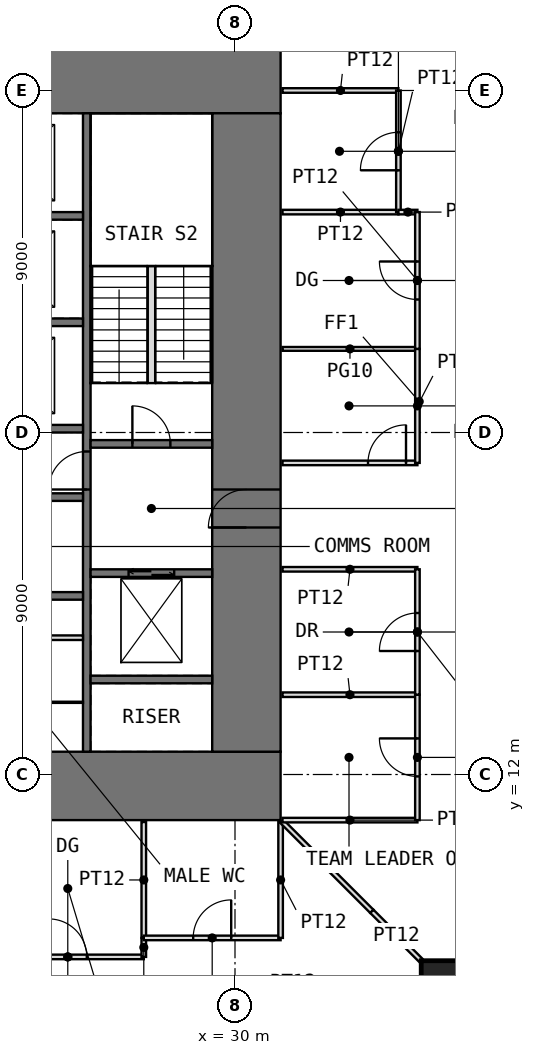
"""IFC4 building model, lengths in metres.
Left out: names, types, materials, properties, quantities, classifications, styles, units other than length and angle.
Written with IfcOpenShell. Run it as: python <this file> out.ifc"""

import sys

from ifc_helpers import new_model, si_unit, direction, frame, frame_2d, origin, origin_2d, place, context, subcontext, project, spatial, rectangle, extrude, element, fill, save


model = new_model("IFC4")
c1 = context("Model", 3, precision=1e-05, world=origin(), true_north=direction((0.0, 1.0)))
c2 = subcontext(c1, "Body", "Model", "MODEL_VIEW")
j1 = project(units=[si_unit("LENGTHUNIT", "METRE"), si_unit("PLANEANGLEUNIT", "RADIAN")], contexts=[c1])
p1 = place(None, origin())
s1 = spatial("IfcSite", under=j1, at=p1, CompositionType="ELEMENT")
p2 = place(p1, origin())
s2 = spatial("IfcBuilding", under=s1, at=p2, CompositionType="ELEMENT")
p3 = place(p2, frame((0.0, 0.0, 58.5)))
s3 = spatial("IfcBuildingStorey", under=s2, at=p3, CompositionType="ELEMENT", Elevation=58.5)
p4 = place(p3, frame((35.45, 6.55, 0.0), z_axis=(0.0, 0.0, 1.0), x_axis=(1.0, 0.0, 0.0)))
e1 = element("IfcColumn", 1, at=p4, inside=s3, PredefinedType="COLUMN", context=c2, shape_type="SweptSolid", body=[
    extrude(rectangle(XDim=1.1, YDim=1.1, at=origin_2d()), origin(), (0.0, 0.0, 1.0), 4.0),
])
p5 = place(p3, frame((10.8, 11.7, -0.05), z_axis=(0.0, 0.0, 1.0), x_axis=(1.0, 0.0, 0.0)))
e2 = element("IfcWall", 2, at=p5, inside=s3, PredefinedType="SHEAR", context=c2, shape_type="SweptSolid", body=[
    extrude(rectangle(XDim=20.4, YDim=1.8, at=frame_2d((10.2, 0.0))), origin(), (0.0, 0.0, 1.0), 4.0),
])
p6 = place(p5, frame((9.2, 0.0, 0.05)))
e3 = element("IfcOpeningElement", 3, at=p6, cuts=e2, PredefinedType="OPENING", context=c2, shape_type="SweptSolid", body=[
    extrude(rectangle(XDim=2.0, YDim=2.2, at=frame_2d((1.0, 1.1))), frame((0.0, 0.91, 0.0), z_axis=(0.0, -1.0, 0.0), x_axis=(1.0, 0.0, 0.0)), (0.0, 0.0, 1.0), 1.82),
])
p7 = place(p3, frame((10.8, 30.3, -0.05), z_axis=(0.0, 0.0, 1.0), x_axis=(1.0, 0.0, 0.0)))
e4 = element("IfcWall", 4, at=p7, inside=s3, PredefinedType="SHEAR", context=c2, shape_type="SweptSolid", body=[
    extrude(rectangle(XDim=20.4, YDim=1.8, at=frame_2d((10.2, 0.0))), origin(), (0.0, 0.0, 1.0), 4.0),
])
p8 = place(p7, frame((9.2, 0.0, 0.05)))
e5 = element("IfcOpeningElement", 5, at=p8, cuts=e4, PredefinedType="OPENING", context=c2, shape_type="SweptSolid", body=[
    extrude(rectangle(XDim=2.0, YDim=2.2, at=frame_2d((1.0, 1.1))), frame((0.0, 0.91, 0.0), z_axis=(0.0, -1.0, 0.0), x_axis=(1.0, 0.0, 0.0)), (0.0, 0.0, 1.0), 1.82),
])
p9 = place(p3, frame((30.3, 12.6, -0.05), z_axis=(0.0, 0.0, 1.0), x_axis=(0.0, 1.0, 0.0)))
e6 = element("IfcWall", 6, at=p9, inside=s3, PredefinedType="SHEAR", context=c2, shape_type="SweptSolid", body=[
    extrude(rectangle(XDim=16.8, YDim=1.8, at=frame_2d((8.4, 0.0))), origin(), (0.0, 0.0, 1.0), 4.0),
])
p10 = place(p9, frame((5.9, 0.0, 0.05)))
e7 = element("IfcOpeningElement", 7, at=p10, cuts=e6, PredefinedType="OPENING", context=c2, shape_type="SweptSolid", body=[
    extrude(rectangle(XDim=1.0, YDim=2.2, at=frame_2d((0.5, 1.1))), frame((0.0, 0.91, 0.0), z_axis=(0.0, -1.0, 0.0), x_axis=(1.0, 0.0, 0.0)), (0.0, 0.0, 1.0), 1.82),
])
p11 = place(p3, frame((26.1, 12.6, -0.05), z_axis=(0.0, 0.0, 1.0), x_axis=(0.0, 1.0, 0.0)))
e8 = element("IfcWall", 8, at=p11, inside=s3, PredefinedType="SHEAR", context=c2, shape_type="SweptSolid", body=[
    extrude(rectangle(XDim=16.8, YDim=0.2, at=frame_2d((8.4, 0.0))), origin(), (0.0, 0.0, 1.0), 4.0),
])
p12 = place(p11, frame((6.9, 0.0, 0.05)))
e9 = element("IfcOpeningElement", 9, at=p12, cuts=e8, PredefinedType="OPENING", context=c2, shape_type="SweptSolid", body=[
    extrude(rectangle(XDim=1.0, YDim=2.2, at=frame_2d((0.5, 1.1))), frame((0.0, 0.11, 0.0), z_axis=(0.0, -1.0, 0.0), x_axis=(1.0, 0.0, 0.0)), (0.0, 0.0, 1.0), 0.22),
])
for number, where, z_axis, x_axis in (
    (10, (22.8, 16.7, -0.05), (0.0, 0.0, 1.0), (1.0, 0.0, 0.0)),
    (11, (22.8, 19.3, -0.05), (0.0, 0.0, 1.0), (1.0, 0.0, 0.0)),
    (12, (22.8, 21.1, -0.05), (0.0, 0.0, 1.0), (1.0, 0.0, 0.0)),
    (13, (22.8, 23.9, -0.05), (0.0, 0.0, 1.0), (1.0, 0.0, 0.0)),
    (14, (22.8, 26.7, -0.05), (0.0, 0.0, 1.0), (1.0, 0.0, 0.0)),
    (15, (26.2, 14.5, -0.05), (0.0, 0.0, 1.0), (1.0, 0.0, 0.0)),
):
    element("IfcWall", number, at=place(p3, frame(where, z_axis=z_axis, x_axis=x_axis)), inside=s3, PredefinedType="SHEAR", context=c2, shape_type="SweptSolid", body=[
        extrude(rectangle(XDim=3.2, YDim=0.2, at=frame_2d((1.6, 0.0))), origin(), (0.0, 0.0, 1.0), 4.0),
    ])
p13 = place(p3, frame((26.2, 17.3, -0.05), z_axis=(0.0, 0.0, 1.0), x_axis=(1.0, 0.0, 0.0)))
e16 = element("IfcWall", 16, at=p13, inside=s3, PredefinedType="SHEAR", context=c2, shape_type="SweptSolid", body=[
    extrude(rectangle(XDim=3.2, YDim=0.2, at=frame_2d((1.6, 0.0))), origin(), (0.0, 0.0, 1.0), 4.0),
])
p14 = place(p13, frame((1.0, 0.0, 0.05)))
e17 = element("IfcOpeningElement", 17, at=p14, cuts=e16, PredefinedType="OPENING", context=c2, shape_type="SweptSolid", body=[
    extrude(rectangle(XDim=1.2, YDim=2.2, at=frame_2d((0.6, 1.1))), frame((0.0, 0.11, 0.0), z_axis=(0.0, -1.0, 0.0), x_axis=(1.0, 0.0, 0.0)), (0.0, 0.0, 1.0), 0.22),
])
p15 = place(p3, frame((26.2, 20.7, -0.05), z_axis=(0.0, 0.0, 1.0), x_axis=(1.0, 0.0, 0.0)))
e18 = element("IfcWall", 18, at=p15, inside=s3, PredefinedType="SHEAR", context=c2, shape_type="SweptSolid", body=[
    extrude(rectangle(XDim=3.2, YDim=0.2, at=frame_2d((1.6, 0.0))), origin(), (0.0, 0.0, 1.0), 4.0),
])
p16 = place(p15, frame((1.1, 0.0, 0.05)))
e19 = element("IfcOpeningElement", 19, at=p16, cuts=e18, PredefinedType="OPENING", context=c2, shape_type="SweptSolid", body=[
    extrude(rectangle(XDim=1.0, YDim=2.2, at=frame_2d((0.5, 1.1))), frame((0.0, 0.11, 0.0), z_axis=(0.0, -1.0, 0.0), x_axis=(1.0, 0.0, 0.0)), (0.0, 0.0, 1.0), 0.22),
])
p17 = place(p3, frame((22.8, 15.6, 0.0), z_axis=(0.0, 0.0, 1.0), x_axis=(1.0, 0.0, 0.0)))
e20 = element("IfcWall", 20, at=p17, inside=s3, PredefinedType="PARTITIONING", context=c2, shape_type="SweptSolid", body=[
    extrude(rectangle(XDim=3.2, YDim=0.12, at=frame_2d((1.6, 0.0))), origin(), (0.0, 0.0, 1.0), 3.75),
])
p18 = place(p3, frame((24.6, 13.9, 0.0), z_axis=(0.0, 0.0, 1.0), x_axis=(1.0, 0.0, 0.0)))
e21 = element("IfcWall", 21, at=p18, inside=s3, PredefinedType="PARTITIONING", context=c2, shape_type="SweptSolid", body=[
    extrude(rectangle(XDim=1.4, YDim=0.03, at=frame_2d((0.7, 0.0))), origin(), (0.0, 0.0, 1.0), 3.75),
])
p19 = place(p3, frame((23.6, 7.2, 0.0), z_axis=(0.0, 0.0, 1.0), x_axis=(1.0, 0.0, 0.0)))
e22 = element("IfcWall", 22, at=p19, inside=s3, PredefinedType="PARTITIONING", context=c2, shape_type="SweptSolid", body=[
    extrude(rectangle(XDim=4.0, YDim=0.12, at=frame_2d((2.0, 0.0))), origin(), (0.0, 0.0, 1.0), 3.75),
])
p20 = place(p19, frame((1.5, 0.0, 0.0)))
e23 = element("IfcOpeningElement", 23, at=p20, cuts=e22, PredefinedType="OPENING", context=c2, shape_type="SweptSolid", body=[
    extrude(rectangle(XDim=1.0, YDim=2.4, at=frame_2d((0.5, 1.2))), frame((0.0, 0.07, 0.0), z_axis=(0.0, -1.0, 0.0), x_axis=(1.0, 0.0, 0.0)), (0.0, 0.0, 1.0), 0.14),
])
p21 = place(p3, frame((27.6, 7.2, 0.0), z_axis=(0.0, 0.0, 1.0), x_axis=(0.0, 1.0, 0.0)))
e24 = element("IfcWall", 24, at=p21, inside=s3, PredefinedType="PARTITIONING", context=c2, shape_type="SweptSolid", body=[
    extrude(rectangle(XDim=0.5, YDim=0.12, at=frame_2d((0.25, 0.0))), origin(), (0.0, 0.0, 1.0), 3.75),
])
p22 = place(p3, frame((27.6, 7.7, 0.0), z_axis=(0.0, 0.0, 1.0), x_axis=(0.0, 1.0, 0.0)))
e25 = element("IfcWall", 25, at=p22, inside=s3, PredefinedType="PARTITIONING", context=c2, shape_type="SweptSolid", body=[
    extrude(rectangle(XDim=3.05, YDim=0.12, at=frame_2d((1.525, 0.0))), origin(), (0.0, 0.0, 1.0), 3.75),
])
p23 = place(p3, frame((27.6, 7.7, 0.0), z_axis=(0.0, 0.0, 1.0), x_axis=(1.0, 0.0, 0.0)))
e26 = element("IfcWall", 26, at=p23, inside=s3, PredefinedType="PARTITIONING", context=c2, shape_type="SweptSolid", body=[
    extrude(rectangle(XDim=3.6, YDim=0.12, at=frame_2d((1.8, 0.0))), origin(), (0.0, 0.0, 1.0), 3.75),
])
p24 = place(p23, frame((1.3, 0.0, 0.0)))
e27 = element("IfcOpeningElement", 27, at=p24, cuts=e26, PredefinedType="OPENING", context=c2, shape_type="SweptSolid", body=[
    extrude(rectangle(XDim=1.0, YDim=2.2, at=frame_2d((0.5, 1.1))), frame((0.0, 0.07, 0.0), z_axis=(0.0, -1.0, 0.0), x_axis=(1.0, 0.0, 0.0)), (0.0, 0.0, 1.0), 0.14),
])
p25 = place(p3, frame((31.2, 7.7, 0.0), z_axis=(0.0, 0.0, 1.0), x_axis=(0.0, 1.0, 0.0)))
e28 = element("IfcWall", 28, at=p25, inside=s3, PredefinedType="PARTITIONING", context=c2, shape_type="SweptSolid", body=[
    extrude(rectangle(XDim=3.05, YDim=0.12, at=frame_2d((1.525, 0.0))), origin(), (0.0, 0.0, 1.0), 3.75),
])
p26 = place(p3, frame((31.235, 10.765, 0.0), z_axis=(0.0, 0.0, 1.0), x_axis=(0.707106781187, -0.707106781187, 0.0)))
e29 = element("IfcWall", 29, at=p26, inside=s3, PredefinedType="PARTITIONING", context=c2, shape_type="SweptSolid", body=[
    extrude(rectangle(XDim=3.346, YDim=0.12, at=frame_2d((1.673, 0.0))), origin(), (0.0, 0.0, 1.0), 3.75),
])
for number, where, z_axis, x_axis in (
    (30, (31.25, 10.8, 0.0), (0.0, 0.0, 1.0), (1.0, 0.0, 0.0)),
    (31, (31.25, 14.1, 0.0), (0.0, 0.0, 1.0), (1.0, 0.0, 0.0)),
    (32, (31.25, 17.4, 0.0), (0.0, 0.0, 1.0), (1.0, 0.0, 0.0)),
):
    element("IfcWall", number, at=place(p3, frame(where, z_axis=z_axis, x_axis=x_axis)), inside=s3, PredefinedType="PARTITIONING", context=c2, shape_type="SweptSolid", body=[
        extrude(rectangle(XDim=3.55, YDim=0.12, at=frame_2d((1.775, 0.0))), origin(), (0.0, 0.0, 1.0), 3.75),
    ])
p27 = place(p3, frame((31.25, 20.2, 0.0), z_axis=(0.0, 0.0, 1.0), x_axis=(1.0, 0.0, 0.0)))
e33 = element("IfcWall", 33, at=p27, inside=s3, PredefinedType="PARTITIONING", context=c2, shape_type="SweptSolid", body=[
    extrude(rectangle(XDim=3.55, YDim=0.12, at=frame_2d((1.775, 0.0))), origin(), (0.0, 0.0, 1.0), 3.75),
])
p28 = place(p27, frame((2.25, 0.0, 0.0)))
e34 = element("IfcOpeningElement", 34, at=p28, cuts=e33, PredefinedType="OPENING", context=c2, shape_type="SweptSolid", body=[
    extrude(rectangle(XDim=1.0, YDim=2.4, at=frame_2d((0.5, 1.2))), frame((0.0, 0.07, 0.0), z_axis=(0.0, -1.0, 0.0), x_axis=(1.0, 0.0, 0.0)), (0.0, 0.0, 1.0), 0.14),
])
p29 = place(p3, frame((31.25, 23.2, 0.0), z_axis=(0.0, 0.0, 1.0), x_axis=(1.0, 0.0, 0.0)))
e35 = element("IfcWall", 35, at=p29, inside=s3, PredefinedType="PARTITIONING", context=c2, shape_type="SweptSolid", body=[
    extrude(rectangle(XDim=3.55, YDim=0.1, at=frame_2d((1.775, 0.0))), origin(), (0.0, 0.0, 1.0), 3.75),
])
for number, where, z_axis, x_axis in (
    (36, (31.25, 26.8, 0.0), (0.0, 0.0, 1.0), (1.0, 0.0, 0.0)),
    (37, (31.25, 30.0, 0.0), (0.0, 0.0, 1.0), (1.0, 0.0, 0.0)),
):
    element("IfcWall", number, at=place(p3, frame(where, z_axis=z_axis, x_axis=x_axis)), inside=s3, PredefinedType="PARTITIONING", context=c2, shape_type="SweptSolid", body=[
        extrude(rectangle(XDim=3.05, YDim=0.12, at=frame_2d((1.525, 0.0))), origin(), (0.0, 0.0, 1.0), 3.75),
    ])
p30 = place(p3, frame((33.602, 8.398, 0.0), z_axis=(0.0, 0.0, 1.0), x_axis=(0.707106781187, -0.707106781187, 0.0)))
e38 = element("IfcWall", 38, at=p30, inside=s3, PredefinedType="PARTITIONING", context=c2, shape_type="SweptSolid", body=[
    extrude(rectangle(XDim=1.822, YDim=0.12, at=frame_2d((0.911, 0.0))), origin(), (0.0, 0.0, 1.0), 3.75),
])
p31 = place(p3, frame((34.3, 26.8, 0.0), z_axis=(0.0, 0.0, 1.0), x_axis=(0.0, 1.0, 0.0)))
e39 = element("IfcWall", 39, at=p31, inside=s3, PredefinedType="PARTITIONING", context=c2, shape_type="SweptSolid", body=[
    extrude(rectangle(XDim=3.2, YDim=0.12, at=frame_2d((1.6, 0.0))), origin(), (0.0, 0.0, 1.0), 3.75),
])
p32 = place(p31, frame((1.1, 0.0, 0.0)))
e40 = element("IfcOpeningElement", 40, at=p32, cuts=e39, PredefinedType="OPENING", context=c2, shape_type="SweptSolid", body=[
    extrude(rectangle(XDim=1.0, YDim=2.2, at=frame_2d((0.5, 1.1))), frame((0.0, 0.07, 0.0), z_axis=(0.0, -1.0, 0.0), x_axis=(1.0, 0.0, 0.0)), (0.0, 0.0, 1.0), 0.14),
])
p33 = place(p3, frame((34.3, 26.8, 0.0), z_axis=(0.0, 0.0, 1.0), x_axis=(1.0, 0.0, 0.0)))
e41 = element("IfcWall", 41, at=p33, inside=s3, PredefinedType="PARTITIONING", context=c2, shape_type="SweptSolid", body=[
    extrude(rectangle(XDim=0.5, YDim=0.12, at=frame_2d((0.25, 0.0))), origin(), (0.0, 0.0, 1.0), 3.75),
])
p34 = place(p3, frame((34.8, 10.8, 0.0), z_axis=(0.0, 0.0, 1.0), x_axis=(0.0, 1.0, 0.0)))
e42 = element("IfcWall", 42, at=p34, inside=s3, PredefinedType="PARTITIONING", context=c2, shape_type="SweptSolid", body=[
    extrude(rectangle(XDim=3.3, YDim=0.12, at=frame_2d((1.65, 0.0))), origin(), (0.0, 0.0, 1.0), 3.75),
])
p35 = place(p34, frame((1.15, 0.0, 0.0)))
e43 = element("IfcOpeningElement", 43, at=p35, cuts=e42, PredefinedType="OPENING", context=c2, shape_type="SweptSolid", body=[
    extrude(rectangle(XDim=1.0, YDim=2.2, at=frame_2d((0.5, 1.1))), frame((0.0, 0.07, 0.0), z_axis=(0.0, -1.0, 0.0), x_axis=(1.0, 0.0, 0.0)), (0.0, 0.0, 1.0), 0.14),
])
p36 = place(p3, frame((34.8, 14.1, 0.0), z_axis=(0.0, 0.0, 1.0), x_axis=(0.0, 1.0, 0.0)))
e44 = element("IfcWall", 44, at=p36, inside=s3, PredefinedType="PARTITIONING", context=c2, shape_type="SweptSolid", body=[
    extrude(rectangle(XDim=3.3, YDim=0.12, at=frame_2d((1.65, 0.0))), origin(), (0.0, 0.0, 1.0), 3.75),
])
p37 = place(p36, frame((1.15, 0.0, 0.0)))
e45 = element("IfcOpeningElement", 45, at=p37, cuts=e44, PredefinedType="OPENING", context=c2, shape_type="SweptSolid", body=[
    extrude(rectangle(XDim=1.0, YDim=2.2, at=frame_2d((0.5, 1.1))), frame((0.0, 0.07, 0.0), z_axis=(0.0, -1.0, 0.0), x_axis=(1.0, 0.0, 0.0)), (0.0, 0.0, 1.0), 0.14),
])
p38 = place(p3, frame((34.8, 20.2, 0.0), z_axis=(0.0, 0.0, 1.0), x_axis=(0.0, 1.0, 0.0)))
e46 = element("IfcWall", 46, at=p38, inside=s3, PredefinedType="PARTITIONING", context=c2, shape_type="SweptSolid", body=[
    extrude(rectangle(XDim=3.0, YDim=0.12, at=frame_2d((1.5, 0.0))), origin(), (0.0, 0.0, 1.0), 3.75),
])
p39 = place(p3, frame((34.8, 23.2, 0.0), z_axis=(0.0, 0.0, 1.0), x_axis=(0.0, 1.0, 0.0)))
e47 = element("IfcWall", 47, at=p39, inside=s3, PredefinedType="PARTITIONING", context=c2, shape_type="SweptSolid", body=[
    extrude(rectangle(XDim=3.6, YDim=0.12, at=frame_2d((1.8, 0.0))), origin(), (0.0, 0.0, 1.0), 3.75),
])
p40 = place(p39, frame((1.3, 0.0, 0.0)))
e48 = element("IfcOpeningElement", 48, at=p40, cuts=e47, PredefinedType="OPENING", context=c2, shape_type="SweptSolid", body=[
    extrude(rectangle(XDim=1.0, YDim=2.4, at=frame_2d((0.5, 1.2))), frame((0.0, 0.07, 0.0), z_axis=(0.0, -1.0, 0.0), x_axis=(1.0, 0.0, 0.0)), (0.0, 0.0, 1.0), 0.14),
])
p41 = place(p3, frame((27.8, 22.3, 0.0), z_axis=(0.0, 0.0, 1.0), x_axis=(0.0, 1.0, 0.0)))
e49 = element("IfcWall", 49, at=p41, inside=s3, PredefinedType="PARTITIONING", context=c2, shape_type="SweptSolid", body=[
    extrude(rectangle(XDim=3.08, YDim=0.2, at=frame_2d((1.54, 0.0))), origin(), (0.0, 0.0, 1.0), 4.0),
])
p42 = place(p10, origin())
e50 = element("IfcDoor", 50, at=p42, inside=s3, OperationType="SINGLE_SWING_LEFT", PredefinedType="DOOR", context=c2, shape_type="SweptSolid", body=[
    extrude(rectangle(XDim=1.0, YDim=2.2, at=frame_2d((0.5, 1.1))), frame((0.0, 0.025, 0.0), z_axis=(0.0, -1.0, 0.0), x_axis=(1.0, 0.0, 0.0)), (0.0, 0.0, 1.0), 0.05),
])
fill(e7, e50)
p43 = place(p16, origin())
e51 = element("IfcDoor", 51, at=p43, inside=s3, OperationType="SINGLE_SWING_LEFT", PredefinedType="DOOR", context=c2, shape_type="SweptSolid", body=[
    extrude(rectangle(XDim=1.0, YDim=2.2, at=frame_2d((0.5, 1.1))), frame((0.0, 0.025, 0.0), z_axis=(0.0, -1.0, 0.0), x_axis=(1.0, 0.0, 0.0)), (0.0, 0.0, 1.0), 0.05),
])
fill(e19, e51)
p44 = place(p12, origin())
e52 = element("IfcDoor", 52, at=p44, inside=s3, OperationType="SINGLE_SWING_LEFT", PredefinedType="DOOR", context=c2, shape_type="SweptSolid", body=[
    extrude(rectangle(XDim=1.0, YDim=2.2, at=frame_2d((0.5, 1.1))), frame((0.0, 0.025, 0.0), z_axis=(0.0, -1.0, 0.0), x_axis=(1.0, 0.0, 0.0)), (0.0, 0.0, 1.0), 0.05),
])
fill(e9, e52)
p45 = place(p20, origin())
e53 = element("IfcDoor", 53, at=p45, inside=s3, OperationType="SINGLE_SWING_LEFT", PredefinedType="DOOR", context=c2, shape_type="SweptSolid", body=[
    extrude(rectangle(XDim=1.0, YDim=2.4, at=frame_2d((0.5, 1.2))), frame((0.0, 0.025, 0.0), z_axis=(0.0, -1.0, 0.0), x_axis=(1.0, 0.0, 0.0)), (0.0, 0.0, 1.0), 0.05),
])
fill(e23, e53)
p46 = place(p24, origin())
e54 = element("IfcDoor", 54, at=p46, inside=s3, OperationType="SINGLE_SWING_RIGHT", PredefinedType="DOOR", context=c2, shape_type="SweptSolid", body=[
    extrude(rectangle(XDim=1.0, YDim=2.2, at=frame_2d((0.5, 1.1))), frame((0.0, 0.025, 0.0), z_axis=(0.0, -1.0, 0.0), x_axis=(1.0, 0.0, 0.0)), (0.0, 0.0, 1.0), 0.05),
])
fill(e27, e54)
p47 = place(p35, origin())
e55 = element("IfcDoor", 55, at=p47, inside=s3, OperationType="SINGLE_SWING_RIGHT", PredefinedType="DOOR", context=c2, shape_type="SweptSolid", body=[
    extrude(rectangle(XDim=1.0, YDim=2.2, at=frame_2d((0.5, 1.1))), frame((0.0, 0.025, 0.0), z_axis=(0.0, -1.0, 0.0), x_axis=(1.0, 0.0, 0.0)), (0.0, 0.0, 1.0), 0.05),
])
fill(e43, e55)
p48 = place(p37, origin())
e56 = element("IfcDoor", 56, at=p48, inside=s3, OperationType="SINGLE_SWING_LEFT", PredefinedType="DOOR", context=c2, shape_type="SweptSolid", body=[
    extrude(rectangle(XDim=1.0, YDim=2.2, at=frame_2d((0.5, 1.1))), frame((0.0, 0.025, 0.0), z_axis=(0.0, -1.0, 0.0), x_axis=(1.0, 0.0, 0.0)), (0.0, 0.0, 1.0), 0.05),
])
fill(e45, e56)
p49 = place(p40, origin())
e57 = element("IfcDoor", 57, at=p49, inside=s3, OperationType="SINGLE_SWING_RIGHT", PredefinedType="DOOR", context=c2, shape_type="SweptSolid", body=[
    extrude(rectangle(XDim=1.0, YDim=2.4, at=frame_2d((0.5, 1.2))), frame((0.0, 0.025, 0.0), z_axis=(0.0, -1.0, 0.0), x_axis=(1.0, 0.0, 0.0)), (0.0, 0.0, 1.0), 0.05),
])
fill(e48, e57)
p50 = place(p32, origin())
e58 = element("IfcDoor", 58, at=p50, inside=s3, OperationType="SINGLE_SWING_LEFT", PredefinedType="DOOR", context=c2, shape_type="SweptSolid", body=[
    extrude(rectangle(XDim=1.0, YDim=2.2, at=frame_2d((0.5, 1.1))), frame((0.0, 0.025, 0.0), z_axis=(0.0, -1.0, 0.0), x_axis=(1.0, 0.0, 0.0)), (0.0, 0.0, 1.0), 0.05),
])
fill(e40, e58)
p51 = place(p28, origin())
e59 = element("IfcDoor", 59, at=p51, inside=s3, OperationType="SINGLE_SWING_RIGHT", PredefinedType="DOOR", context=c2, shape_type="SweptSolid", body=[
    extrude(rectangle(XDim=1.0, YDim=2.4, at=frame_2d((0.5, 1.2))), frame((0.0, 0.025, 0.0), z_axis=(0.0, -1.0, 0.0), x_axis=(1.0, 0.0, 0.0)), (0.0, 0.0, 1.0), 0.05),
])
fill(e34, e59)
p52 = place(p14, origin())
e60 = element("IfcDoor", 60, at=p52, inside=s3, OperationType="DOUBLE_DOOR_SLIDING", PredefinedType="DOOR", context=c2, shape_type="SweptSolid", body=[
    extrude(rectangle(XDim=1.2, YDim=2.2, at=frame_2d((0.6, 1.1))), frame((0.0, 0.025, 0.0), z_axis=(0.0, -1.0, 0.0), x_axis=(1.0, 0.0, 0.0)), (0.0, 0.0, 1.0), 0.05),
])
fill(e17, e60)
save(model, sys.argv[1])
